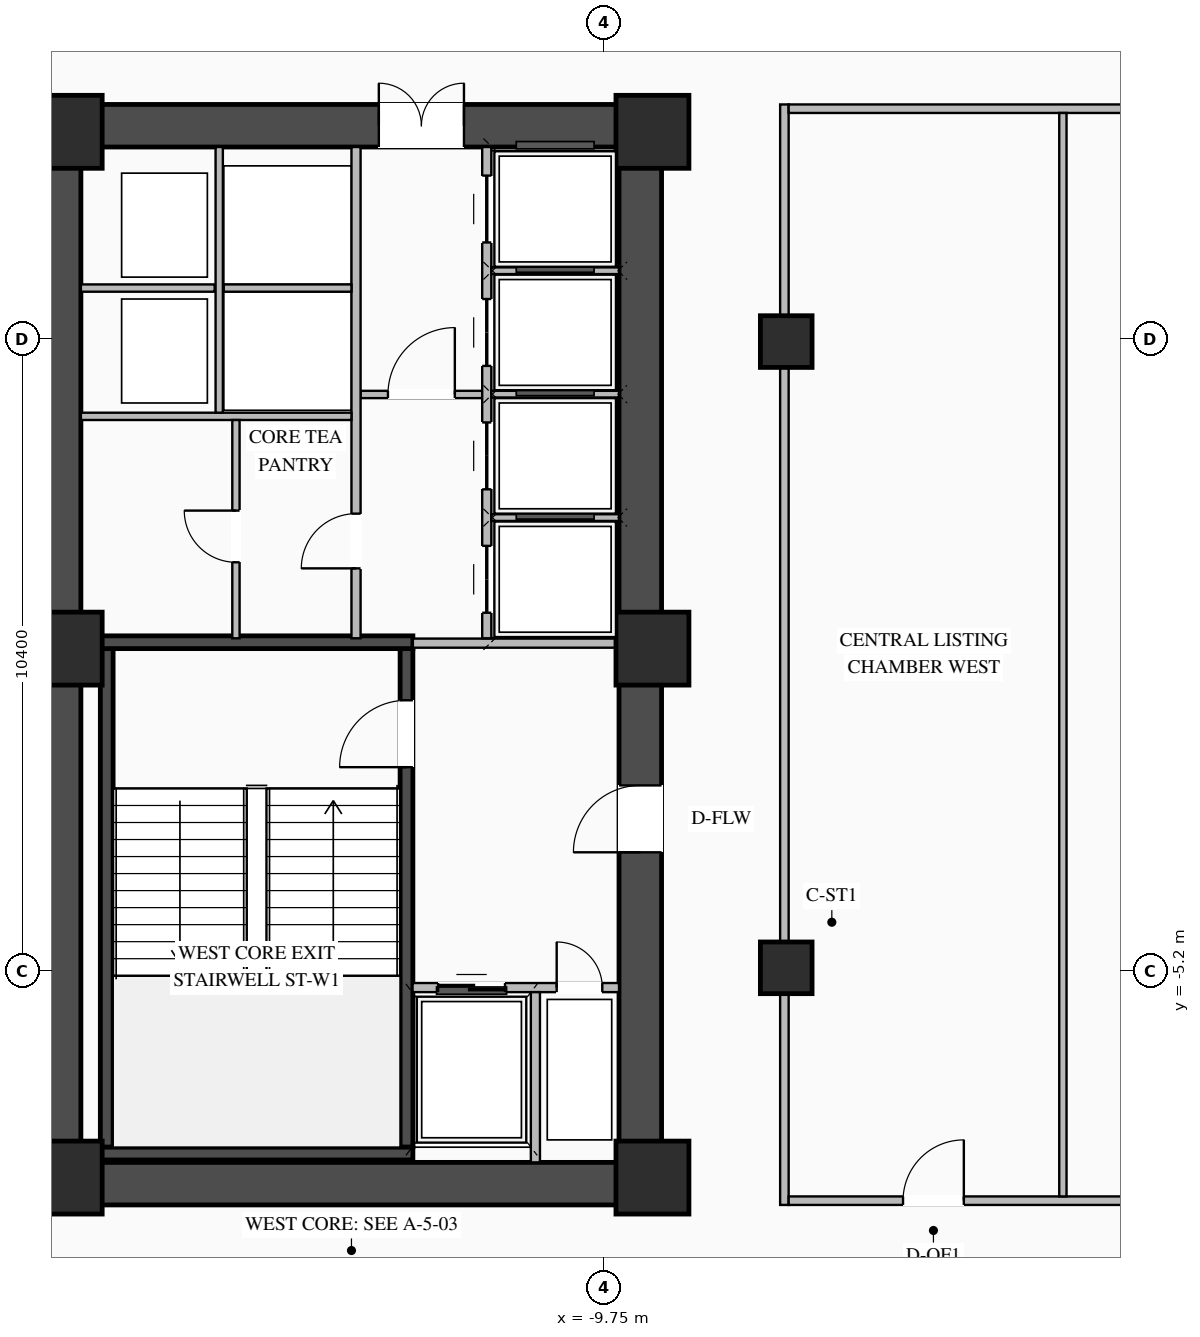
"""IFC4 building model, lengths in metres.
Left out: names, types, materials, properties, quantities, classifications, styles, units other than length and angle.
Written with IfcOpenShell. Run it as: python <this file> out.ifc"""

import sys

from ifc_helpers import new_model, si_unit, direction, frame, frame_2d, origin, origin_2d, place, context, subcontext, project, spatial, rectangle, i_section, extrude, element, fill, save


model = new_model("IFC4")
c1 = context("Model", 3, precision=1e-05, world=origin(), true_north=direction((0.0, 1.0)))
c2 = subcontext(c1, "Body", "Model", "MODEL_VIEW")
j1 = project(units=[si_unit("LENGTHUNIT", "METRE"), si_unit("PLANEANGLEUNIT", "RADIAN")], contexts=[c1])
p1 = place(None, origin())
s1 = spatial("IfcSite", under=j1, at=p1, CompositionType="ELEMENT")
p2 = place(p1, origin())
s2 = spatial("IfcBuilding", under=s1, at=p2, CompositionType="ELEMENT")
p3 = place(p2, frame((0.0, 0.0, 65.7)))
s3 = spatial("IfcBuildingStorey", under=s2, at=p3, CompositionType="ELEMENT", Elevation=65.7)
p4 = place(p3, frame((-19.05, -8.7, 0.0), z_axis=(0.0, 0.0, 1.0), x_axis=(1.0, 0.0, 0.0)))
e1 = element("IfcWall", 1, at=p4, inside=s3, PredefinedType="SHEAR", context=c2, shape_type="SweptSolid", body=[
    extrude(rectangle(XDim=10.25, YDim=0.7, at=frame_2d((5.125, 0.0))), origin(), (0.0, 0.0, 1.0), 4.02),
])
p5 = place(p3, frame((-19.05, 8.7, 0.0), z_axis=(0.0, 0.0, 1.0), x_axis=(1.0, 0.0, 0.0)))
e2 = element("IfcWall", 2, at=p5, inside=s3, PredefinedType="SHEAR", context=c2, shape_type="SweptSolid", body=[
    extrude(rectangle(XDim=10.25, YDim=0.7, at=frame_2d((5.125, 0.0))), origin(), (0.0, 0.0, 1.0), 4.02),
])
p6 = place(p5, frame((5.6, 0.0, 0.0)))
e3 = element("IfcOpeningElement", 3, at=p6, cuts=e2, PredefinedType="OPENING", context=c2, shape_type="SweptSolid", body=[
    extrude(rectangle(XDim=1.4, YDim=2.05, at=frame_2d((0.7, 1.025))), frame((0.0, 0.36, 0.0), z_axis=(0.0, -1.0, 0.0), x_axis=(1.0, 0.0, 0.0)), (0.0, 0.0, 1.0), 0.72),
])
p7 = place(p3, frame((-18.7, -8.35, 0.0), z_axis=(0.0, 0.0, 1.0), x_axis=(0.0, 1.0, 0.0)))
e4 = element("IfcWall", 4, at=p7, inside=s3, PredefinedType="SHEAR", context=c2, shape_type="SweptSolid", body=[
    extrude(rectangle(XDim=16.7, YDim=0.7, at=frame_2d((8.35, 0.0))), origin(), (0.0, 0.0, 1.0), 4.02),
])
p8 = place(p3, frame((-9.15, -8.35, 0.0), z_axis=(0.0, 0.0, 1.0), x_axis=(0.0, 1.0, 0.0)))
e5 = element("IfcWall", 5, at=p8, inside=s3, PredefinedType="SHEAR", context=c2, shape_type="SweptSolid", body=[
    extrude(rectangle(XDim=16.7, YDim=0.7, at=frame_2d((8.35, 0.0))), origin(), (0.0, 0.0, 1.0), 4.02),
])
p9 = place(p8, frame((5.1, 0.0, 0.0)))
e6 = element("IfcOpeningElement", 6, at=p9, cuts=e5, PredefinedType="OPENING", context=c2, shape_type="SweptSolid", body=[
    extrude(rectangle(XDim=1.1, YDim=2.08, at=frame_2d((0.55, 1.04))), frame((0.0, 0.36, 0.0), z_axis=(0.0, -1.0, 0.0), x_axis=(1.0, 0.0, 0.0)), (0.0, 0.0, 1.0), 0.72),
])
p10 = place(p3, frame((-12.995, -8.1, 0.0), z_axis=(0.0, 0.0, 1.0), x_axis=(0.0, 1.0, 0.0)))
e7 = element("IfcWall", 7, at=p10, inside=s3, PredefinedType="SHEAR", context=c2, shape_type="SweptSolid", body=[
    extrude(rectangle(XDim=8.2, YDim=0.21, at=frame_2d((4.1, 0.0))), origin(), (0.0, 0.0, 1.0), 4.02),
])
p11 = place(p10, frame((6.25, 0.0, 0.0)))
e8 = element("IfcOpeningElement", 8, at=p11, cuts=e7, PredefinedType="OPENING", context=c2, shape_type="SweptSolid", body=[
    extrude(rectangle(XDim=1.1, YDim=2.15, at=frame_2d((0.55, 1.075))), frame((0.0, 0.115, 0.0), z_axis=(0.0, -1.0, 0.0), x_axis=(1.0, 0.0, 0.0)), (0.0, 0.0, 1.0), 0.23),
])
p12 = place(p3, frame((-17.925, -8.1, 0.0), z_axis=(0.0, 0.0, 1.0), x_axis=(0.0, 1.0, 0.0)))
e9 = element("IfcWall", 9, at=p12, inside=s3, PredefinedType="SHEAR", context=c2, shape_type="SweptSolid", body=[
    extrude(rectangle(XDim=8.2, YDim=0.21, at=frame_2d((4.1, 0.0))), origin(), (0.0, 0.0, 1.0), 4.02),
])
for number, where, z_axis, x_axis in (
    (10, (-18.03, -8.205, 0.0), (0.0, 0.0, 1.0), (1.0, 0.0, 0.0)),
    (11, (-12.89, 0.205, 0.0), (0.0, 0.0, 1.0), (-1.0, 0.0, 0.0)),
):
    element("IfcWall", number, at=place(p3, frame(where, z_axis=z_axis, x_axis=x_axis)), inside=s3, PredefinedType="SHEAR", context=c2, shape_type="SweptSolid", body=[
        extrude(rectangle(XDim=5.14, YDim=0.21, at=frame_2d((2.57, 0.0))), origin(), (0.0, 0.0, 1.0), 4.02),
    ])
for number, where, z_axis, x_axis in (
    (12, (-8.95, -8.6, 0.0), (0.0, 0.0, 1.0), (1.0, 0.0, 0.0)),
    (13, (-8.95, 0.1, 0.0), (0.0, 0.0, 1.0), (1.0, 0.0, 0.0)),
    (14, (-8.95, 8.6, 0.0), (0.0, 0.0, 1.0), (1.0, 0.0, 0.0)),
    (15, (-18.6, -8.6, 0.0), (0.0, 0.0, 1.0), (1.0, 0.0, 0.0)),
    (16, (-18.6, 0.1, 0.0), (0.0, 0.0, 1.0), (1.0, 0.0, 0.0)),
    (17, (-18.6, 8.6, 0.0), (0.0, 0.0, 1.0), (1.0, 0.0, 0.0)),
):
    element("IfcColumn", number, at=place(p3, frame(where, z_axis=z_axis, x_axis=x_axis)), inside=s3, PredefinedType="COLUMN", context=c2, shape_type="SweptSolid", body=[
        extrude(rectangle(XDim=1.2, YDim=1.2, at=origin_2d()), origin(), (0.0, 0.0, 1.0), 4.3),
    ])
for number, where, z_axis, x_axis in (
    (18, (-6.75, -5.15, 0.0), (0.0, 0.0, 1.0), (1.0, 0.0, 0.0)),
    (19, (-6.75, 5.15, 0.0), (0.0, 0.0, 1.0), (1.0, 0.0, 0.0)),
):
    element("IfcColumn", number, at=place(p3, frame(where, z_axis=z_axis, x_axis=x_axis)), inside=s3, PredefinedType="COLUMN", context=c2, shape_type="SweptSolid", body=[
        extrude(i_section(OverallWidth=0.85, OverallDepth=0.85, WebThickness=0.032, FlangeThickness=0.048, at=origin_2d()), origin(), (0.0, 0.0, 1.0), 4.3),
    ])
p13 = place(p3, frame((-12.895, -5.475, 0.0), z_axis=(0.0, 0.0, 1.0), x_axis=(1.0, 0.0, 0.0)))
e20 = element("IfcWall", 20, at=p13, inside=s3, PredefinedType="STANDARD", context=c2, shape_type="SweptSolid", body=[
    extrude(rectangle(XDim=3.395, YDim=0.15, at=frame_2d((1.698, 0.0))), origin(), (0.0, 0.0, 1.0), 4.0),
])
p14 = place(p13, frame((0.42, 0.0, 0.0)))
e21 = element("IfcOpeningElement", 21, at=p14, cuts=e20, PredefinedType="OPENING", context=c2, shape_type="SweptSolid", body=[
    extrude(rectangle(XDim=1.1, YDim=2.15, at=frame_2d((0.55, 1.075))), frame((0.0, 0.085, 0.0), z_axis=(0.0, -1.0, 0.0), x_axis=(1.0, 0.0, 0.0)), (0.0, 0.0, 1.0), 0.17),
])
p15 = place(p13, frame((2.37, 0.0, 0.0)))
e22 = element("IfcOpeningElement", 22, at=p15, cuts=e20, PredefinedType="OPENING", context=c2, shape_type="SweptSolid", body=[
    extrude(rectangle(XDim=0.75, YDim=2.05, at=frame_2d((0.375, 1.025))), frame((0.0, 0.085, 0.0), z_axis=(0.0, -1.0, 0.0), x_axis=(1.0, 0.0, 0.0)), (0.0, 0.0, 1.0), 0.17),
])
p16 = place(p3, frame((-10.875, -8.35, 0.0), z_axis=(0.0, 0.0, 1.0), x_axis=(0.0, 1.0, 0.0)))
e23 = element("IfcWall", 23, at=p16, inside=s3, PredefinedType="STANDARD", context=c2, shape_type="SweptSolid", body=[
    extrude(rectangle(XDim=2.8, YDim=0.15, at=frame_2d((1.4, 0.0))), origin(), (0.0, 0.0, 1.0), 4.0),
])
p17 = place(p3, frame((-12.89, 0.19, 0.0), z_axis=(0.0, 0.0, 1.0), x_axis=(1.0, 0.0, 0.0)))
e24 = element("IfcWall", 24, at=p17, inside=s3, PredefinedType="STANDARD", context=c2, shape_type="SweptSolid", body=[
    extrude(rectangle(XDim=3.39, YDim=0.15, at=frame_2d((1.695, 0.0))), origin(), (0.0, 0.0, 1.0), 3.395),
])
p18 = place(p3, frame((-13.75, 4.28, 0.0), z_axis=(0.0, 0.0, 1.0), x_axis=(1.0, 0.0, 0.0)))
e25 = element("IfcWall", 25, at=p18, inside=s3, PredefinedType="STANDARD", context=c2, shape_type="SweptSolid", body=[
    extrude(rectangle(XDim=2.0, YDim=0.12, at=frame_2d((1.0, 0.0))), origin(), (0.0, 0.0, 1.0), 4.0),
])
p19 = place(p18, frame((0.45, 0.0, 0.0)))
e26 = element("IfcOpeningElement", 26, at=p19, cuts=e25, PredefinedType="OPENING", context=c2, shape_type="SweptSolid", body=[
    extrude(rectangle(XDim=1.1, YDim=2.1, at=frame_2d((0.55, 1.05))), frame((0.0, 0.07, 0.0), z_axis=(0.0, -1.0, 0.0), x_axis=(1.0, 0.0, 0.0)), (0.0, 0.0, 1.0), 0.14),
])
p20 = place(p3, frame((-11.675, 0.27, 0.0), z_axis=(0.0, 0.0, 1.0), x_axis=(0.0, 1.0, 0.0)))
e27 = element("IfcWall", 27, at=p20, inside=s3, PredefinedType="STANDARD", context=c2, shape_type="SweptSolid", body=[
    extrude(rectangle(XDim=8.08, YDim=0.15, at=frame_2d((4.04, 0.0))), origin(), (0.0, 0.0, 1.0), 4.0),
])
p21 = place(p20, frame((0.42, 0.0, 0.0)))
e28 = element("IfcOpeningElement", 28, at=p21, cuts=e27, PredefinedType="OPENING", context=c2, shape_type="SweptSolid", body=[
    extrude(rectangle(XDim=1.1, YDim=2.1, at=frame_2d((0.55, 1.05))), frame((0.0, 0.085, 0.0), z_axis=(0.0, -1.0, 0.0), x_axis=(1.0, 0.0, 0.0)), (0.0, 0.0, 1.0), 0.17),
])
p22 = place(p20, frame((2.45, 0.0, 0.0)))
e29 = element("IfcOpeningElement", 29, at=p22, cuts=e27, PredefinedType="OPENING", context=c2, shape_type="SweptSolid", body=[
    extrude(rectangle(XDim=1.1, YDim=2.1, at=frame_2d((0.55, 1.05))), frame((0.0, 0.085, 0.0), z_axis=(0.0, -1.0, 0.0), x_axis=(1.0, 0.0, 0.0)), (0.0, 0.0, 1.0), 0.17),
])
p23 = place(p20, frame((4.48, 0.0, 0.0)))
e30 = element("IfcOpeningElement", 30, at=p23, cuts=e27, PredefinedType="OPENING", context=c2, shape_type="SweptSolid", body=[
    extrude(rectangle(XDim=1.1, YDim=2.1, at=frame_2d((0.55, 1.05))), frame((0.0, 0.085, 0.0), z_axis=(0.0, -1.0, 0.0), x_axis=(1.0, 0.0, 0.0)), (0.0, 0.0, 1.0), 0.17),
])
p24 = place(p20, frame((6.51, 0.0, 0.0)))
e31 = element("IfcOpeningElement", 31, at=p24, cuts=e27, PredefinedType="OPENING", context=c2, shape_type="SweptSolid", body=[
    extrude(rectangle(XDim=1.1, YDim=2.1, at=frame_2d((0.55, 1.05))), frame((0.0, 0.085, 0.0), z_axis=(0.0, -1.0, 0.0), x_axis=(1.0, 0.0, 0.0)), (0.0, 0.0, 1.0), 0.17),
])
for number, where, z_axis, x_axis in (
    (32, (-11.6, 2.255, 0.0), (0.0, 0.0, 1.0), (1.0, 0.0, 0.0)),
    (33, (-11.6, 4.285, 0.0), (0.0, 0.0, 1.0), (1.0, 0.0, 0.0)),
    (34, (-11.6, 6.315, 0.0), (0.0, 0.0, 1.0), (1.0, 0.0, 0.0)),
):
    element("IfcWall", number, at=place(p3, frame(where, z_axis=z_axis, x_axis=x_axis)), inside=s3, PredefinedType="STANDARD", context=c2, shape_type="SweptSolid", body=[
        extrude(rectangle(XDim=2.1, YDim=0.11, at=frame_2d((1.05, 0.0))), origin(), (0.0, 0.0, 1.0), 4.0),
    ])
p25 = place(p3, frame((-13.825, 0.27, 0.0), z_axis=(0.0, 0.0, 1.0), x_axis=(0.0, 1.0, 0.0)))
e35 = element("IfcWall", 35, at=p25, inside=s3, PredefinedType="STANDARD", context=c2, shape_type="SweptSolid", body=[
    extrude(rectangle(XDim=8.08, YDim=0.15, at=frame_2d((4.04, 0.0))), origin(), (0.0, 0.0, 1.0), 4.0),
])
p26 = place(p25, frame((1.15, 0.0, 0.0)))
e36 = element("IfcOpeningElement", 36, at=p26, cuts=e35, PredefinedType="OPENING", context=c2, shape_type="SweptSolid", body=[
    extrude(rectangle(XDim=0.9, YDim=2.05, at=frame_2d((0.45, 1.025))), frame((0.0, 0.085, 0.0), z_axis=(0.0, -1.0, 0.0), x_axis=(1.0, 0.0, 0.0)), (0.0, 0.0, 1.0), 0.17),
])
p27 = place(p3, frame((-18.35, 3.92, 0.0), z_axis=(0.0, 0.0, 1.0), x_axis=(1.0, 0.0, 0.0)))
e37 = element("IfcWall", 37, at=p27, inside=s3, PredefinedType="STANDARD", context=c2, shape_type="SweptSolid", body=[
    extrude(rectangle(XDim=4.45, YDim=0.12, at=frame_2d((2.225, 0.0))), origin(), (0.0, 0.0, 1.0), 4.0),
])
p28 = place(p3, frame((-18.35, 6.03, 0.0), z_axis=(0.0, 0.0, 1.0), x_axis=(1.0, 0.0, 0.0)))
e38 = element("IfcWall", 38, at=p28, inside=s3, PredefinedType="STANDARD", context=c2, shape_type="SweptSolid", body=[
    extrude(rectangle(XDim=2.2, YDim=0.12, at=frame_2d((1.1, 0.0))), origin(), (0.0, 0.0, 1.0), 4.0),
])
p29 = place(p3, frame((-16.075, 3.98, 0.0), z_axis=(0.0, 0.0, 1.0), x_axis=(0.0, 1.0, 0.0)))
e39 = element("IfcWall", 39, at=p29, inside=s3, PredefinedType="STANDARD", context=c2, shape_type="SweptSolid", body=[
    extrude(rectangle(XDim=4.37, YDim=0.12, at=frame_2d((2.185, 0.0))), origin(), (0.0, 0.0, 1.0), 4.0),
])
p30 = place(p3, frame((-16.0, 6.03, 0.0), z_axis=(0.0, 0.0, 1.0), x_axis=(1.0, 0.0, 0.0)))
e40 = element("IfcWall", 40, at=p30, inside=s3, PredefinedType="STANDARD", context=c2, shape_type="SweptSolid", body=[
    extrude(rectangle(XDim=2.1, YDim=0.12, at=frame_2d((1.05, 0.0))), origin(), (0.0, 0.0, 1.0), 4.0),
])
p31 = place(p3, frame((-15.8, 0.27, 0.0), z_axis=(0.0, 0.0, 1.0), x_axis=(0.0, 1.0, 0.0)))
e41 = element("IfcWall", 41, at=p31, inside=s3, PredefinedType="STANDARD", context=c2, shape_type="SweptSolid", body=[
    extrude(rectangle(XDim=3.59, YDim=0.12, at=frame_2d((1.795, 0.0))), origin(), (0.0, 0.0, 1.0), 4.0),
])
p32 = place(p31, frame((1.25, 0.0, 0.0)))
e42 = element("IfcOpeningElement", 42, at=p32, cuts=e41, PredefinedType="OPENING", context=c2, shape_type="SweptSolid", body=[
    extrude(rectangle(XDim=0.85, YDim=2.05, at=frame_2d((0.425, 1.025))), frame((0.0, 0.07, 0.0), z_axis=(0.0, -1.0, 0.0), x_axis=(1.0, 0.0, 0.0)), (0.0, 0.0, 1.0), 0.14),
])
p33 = place(p3, frame((-6.78, -9.05, 0.0), z_axis=(0.0, 0.0, 1.0), x_axis=(0.0, 1.0, 0.0)))
e43 = element("IfcWall", 43, at=p33, inside=s3, PredefinedType="STANDARD", context=c2, shape_type="SweptSolid", body=[
    extrude(rectangle(XDim=18.1, YDim=0.14, at=frame_2d((9.05, 0.0))), origin(), (0.0, 0.0, 1.0), 3.395),
])
p34 = place(p3, frame((-6.71, -8.98, 0.0), z_axis=(0.0, 0.0, 1.0), x_axis=(1.0, 0.0, 0.0)))
e44 = element("IfcWall", 44, at=p34, inside=s3, PredefinedType="STANDARD", context=c2, shape_type="SweptSolid", body=[
    extrude(rectangle(XDim=13.42, YDim=0.14, at=frame_2d((6.71, 0.0))), origin(), (0.0, 0.0, 1.0), 4.0),
])
p35 = place(p34, frame((1.881, 0.0, 0.0)))
e45 = element("IfcOpeningElement", 45, at=p35, cuts=e44, PredefinedType="OPENING", context=c2, shape_type="SweptSolid", body=[
    extrude(rectangle(XDim=1.0, YDim=2.08, at=frame_2d((0.5, 1.04))), frame((0.0, 0.08, 0.0), z_axis=(0.0, -1.0, 0.0), x_axis=(1.0, 0.0, 0.0)), (0.0, 0.0, 1.0), 0.16),
])
p36 = place(p34, frame((6.21, 0.0, 0.0)))
e46 = element("IfcOpeningElement", 46, at=p36, cuts=e44, PredefinedType="OPENING", context=c2, shape_type="SweptSolid", body=[
    extrude(rectangle(XDim=1.0, YDim=2.08, at=frame_2d((0.5, 1.04))), frame((0.0, 0.08, 0.0), z_axis=(0.0, -1.0, 0.0), x_axis=(1.0, 0.0, 0.0)), (0.0, 0.0, 1.0), 0.16),
])
p37 = place(p34, frame((10.539, 0.0, 0.0)))
e47 = element("IfcOpeningElement", 47, at=p37, cuts=e44, PredefinedType="OPENING", context=c2, shape_type="SweptSolid", body=[
    extrude(rectangle(XDim=1.0, YDim=2.08, at=frame_2d((0.5, 1.04))), frame((0.0, 0.08, 0.0), z_axis=(0.0, -1.0, 0.0), x_axis=(1.0, 0.0, 0.0)), (0.0, 0.0, 1.0), 0.16),
])
p38 = place(p3, frame((-6.71, 8.98, 0.0), z_axis=(0.0, 0.0, 1.0), x_axis=(1.0, 0.0, 0.0)))
e48 = element("IfcWall", 48, at=p38, inside=s3, PredefinedType="STANDARD", context=c2, shape_type="SweptSolid", body=[
    extrude(rectangle(XDim=13.42, YDim=0.14, at=frame_2d((6.71, 0.0))), origin(), (0.0, 0.0, 1.0), 4.0),
])
p39 = place(p3, frame((-2.2, -8.91, 0.0), z_axis=(0.0, 0.0, 1.0), x_axis=(0.0, 1.0, 0.0)))
e49 = element("IfcWall", 49, at=p39, inside=s3, PredefinedType="STANDARD", context=c2, shape_type="SweptSolid", body=[
    extrude(rectangle(XDim=17.82, YDim=0.12, at=frame_2d((8.91, 0.0))), origin(), (0.0, 0.0, 1.0), 4.0),
])
p40 = place(p11, origin())
e50 = element("IfcDoor", 50, at=p40, inside=s3, OperationType="SINGLE_SWING_LEFT", PredefinedType="DOOR", context=c2, shape_type="SweptSolid", body=[
    extrude(rectangle(XDim=1.1, YDim=2.15, at=frame_2d((0.55, 1.075))), frame((0.0, 0.025, 0.0), z_axis=(0.0, -1.0, 0.0), x_axis=(1.0, 0.0, 0.0)), (0.0, 0.0, 1.0), 0.05),
])
fill(e8, e50)
p41 = place(p14, origin())
e51 = element("IfcDoor", 51, at=p41, inside=s3, OperationType="DOUBLE_DOOR_SLIDING", PredefinedType="DOOR", context=c2, shape_type="SweptSolid", body=[
    extrude(rectangle(XDim=1.1, YDim=2.15, at=frame_2d((0.55, 1.075))), frame((0.0, 0.025, 0.0), z_axis=(0.0, -1.0, 0.0), x_axis=(1.0, 0.0, 0.0)), (0.0, 0.0, 1.0), 0.05),
])
fill(e21, e51)
p42 = place(p15, origin())
e52 = element("IfcDoor", 52, at=p42, inside=s3, OperationType="SINGLE_SWING_LEFT", PredefinedType="DOOR", context=c2, shape_type="SweptSolid", body=[
    extrude(rectangle(XDim=0.75, YDim=2.05, at=frame_2d((0.375, 1.025))), frame((0.0, 0.025, 0.0), z_axis=(0.0, -1.0, 0.0), x_axis=(1.0, 0.0, 0.0)), (0.0, 0.0, 1.0), 0.05),
])
fill(e22, e52)
p43 = place(p9, origin())
e53 = element("IfcDoor", 53, at=p43, inside=s3, OperationType="SINGLE_SWING_LEFT", PredefinedType="DOOR", context=c2, shape_type="SweptSolid", body=[
    extrude(rectangle(XDim=1.1, YDim=2.08, at=frame_2d((0.55, 1.04))), frame((0.0, 0.305, 0.0), z_axis=(0.0, -1.0, 0.0), x_axis=(1.0, 0.0, 0.0)), (0.0, 0.0, 1.0), 0.05),
])
fill(e6, e53)
p44 = place(p19, origin())
e54 = element("IfcDoor", 54, at=p44, inside=s3, OperationType="SINGLE_SWING_RIGHT", PredefinedType="DOOR", context=c2, shape_type="SweptSolid", body=[
    extrude(rectangle(XDim=1.1, YDim=2.1, at=frame_2d((0.55, 1.05))), frame((0.0, 0.025, 0.0), z_axis=(0.0, -1.0, 0.0), x_axis=(1.0, 0.0, 0.0)), (0.0, 0.0, 1.0), 0.05),
])
fill(e26, e54)
p45 = place(p6, origin())
e55 = element("IfcDoor", 55, at=p45, inside=s3, OperationType="DOUBLE_DOOR_SINGLE_SWING", PredefinedType="DOOR", context=c2, shape_type="SweptSolid", body=[
    extrude(rectangle(XDim=1.4, YDim=2.05, at=frame_2d((0.7, 1.025))), frame((0.0, 0.295, 0.0), z_axis=(0.0, -1.0, 0.0), x_axis=(1.0, 0.0, 0.0)), (0.0, 0.0, 1.0), 0.05),
])
fill(e3, e55)
p46 = place(p21, origin())
e56 = element("IfcDoor", 56, at=p46, inside=s3, OperationType="DOUBLE_DOOR_SLIDING", PredefinedType="DOOR", context=c2, shape_type="SweptSolid", body=[
    extrude(rectangle(XDim=1.1, YDim=2.1, at=frame_2d((0.55, 1.05))), frame((0.0, 0.025, 0.0), z_axis=(0.0, -1.0, 0.0), x_axis=(1.0, 0.0, 0.0)), (0.0, 0.0, 1.0), 0.05),
])
fill(e28, e56)
p47 = place(p22, origin())
e57 = element("IfcDoor", 57, at=p47, inside=s3, OperationType="DOUBLE_DOOR_SLIDING", PredefinedType="DOOR", context=c2, shape_type="SweptSolid", body=[
    extrude(rectangle(XDim=1.1, YDim=2.1, at=frame_2d((0.55, 1.05))), frame((0.0, 0.025, 0.0), z_axis=(0.0, -1.0, 0.0), x_axis=(1.0, 0.0, 0.0)), (0.0, 0.0, 1.0), 0.05),
])
fill(e29, e57)
p48 = place(p23, origin())
e58 = element("IfcDoor", 58, at=p48, inside=s3, OperationType="DOUBLE_DOOR_SLIDING", PredefinedType="DOOR", context=c2, shape_type="SweptSolid", body=[
    extrude(rectangle(XDim=1.1, YDim=2.1, at=frame_2d((0.55, 1.05))), frame((0.0, 0.025, 0.0), z_axis=(0.0, -1.0, 0.0), x_axis=(1.0, 0.0, 0.0)), (0.0, 0.0, 1.0), 0.05),
])
fill(e30, e58)
p49 = place(p24, origin())
e59 = element("IfcDoor", 59, at=p49, inside=s3, OperationType="DOUBLE_DOOR_SLIDING", PredefinedType="DOOR", context=c2, shape_type="SweptSolid", body=[
    extrude(rectangle(XDim=1.1, YDim=2.1, at=frame_2d((0.55, 1.05))), frame((0.0, 0.025, 0.0), z_axis=(0.0, -1.0, 0.0), x_axis=(1.0, 0.0, 0.0)), (0.0, 0.0, 1.0), 0.05),
])
fill(e31, e59)
p50 = place(p26, origin())
e60 = element("IfcDoor", 60, at=p50, inside=s3, OperationType="SINGLE_SWING_LEFT", PredefinedType="DOOR", context=c2, shape_type="SweptSolid", body=[
    extrude(rectangle(XDim=0.9, YDim=2.05, at=frame_2d((0.45, 1.025))), frame((0.0, 0.025, 0.0), z_axis=(0.0, -1.0, 0.0), x_axis=(1.0, 0.0, 0.0)), (0.0, 0.0, 1.0), 0.05),
])
fill(e36, e60)
p51 = place(p32, origin())
e61 = element("IfcDoor", 61, at=p51, inside=s3, OperationType="SINGLE_SWING_RIGHT", PredefinedType="DOOR", context=c2, shape_type="SweptSolid", body=[
    extrude(rectangle(XDim=0.85, YDim=2.05, at=frame_2d((0.425, 1.025))), frame((0.0, 0.025, 0.0), z_axis=(0.0, -1.0, 0.0), x_axis=(1.0, 0.0, 0.0)), (0.0, 0.0, 1.0), 0.05),
])
fill(e42, e61)
p52 = place(p35, origin())
e62 = element("IfcDoor", 62, at=p52, inside=s3, OperationType="SINGLE_SWING_RIGHT", PredefinedType="DOOR", context=c2, shape_type="SweptSolid", body=[
    extrude(rectangle(XDim=1.0, YDim=2.08, at=frame_2d((0.5, 1.04))), frame((0.0, 0.025, 0.0), z_axis=(0.0, -1.0, 0.0), x_axis=(1.0, 0.0, 0.0)), (0.0, 0.0, 1.0), 0.05),
])
fill(e45, e62)
save(model, sys.argv[1])
